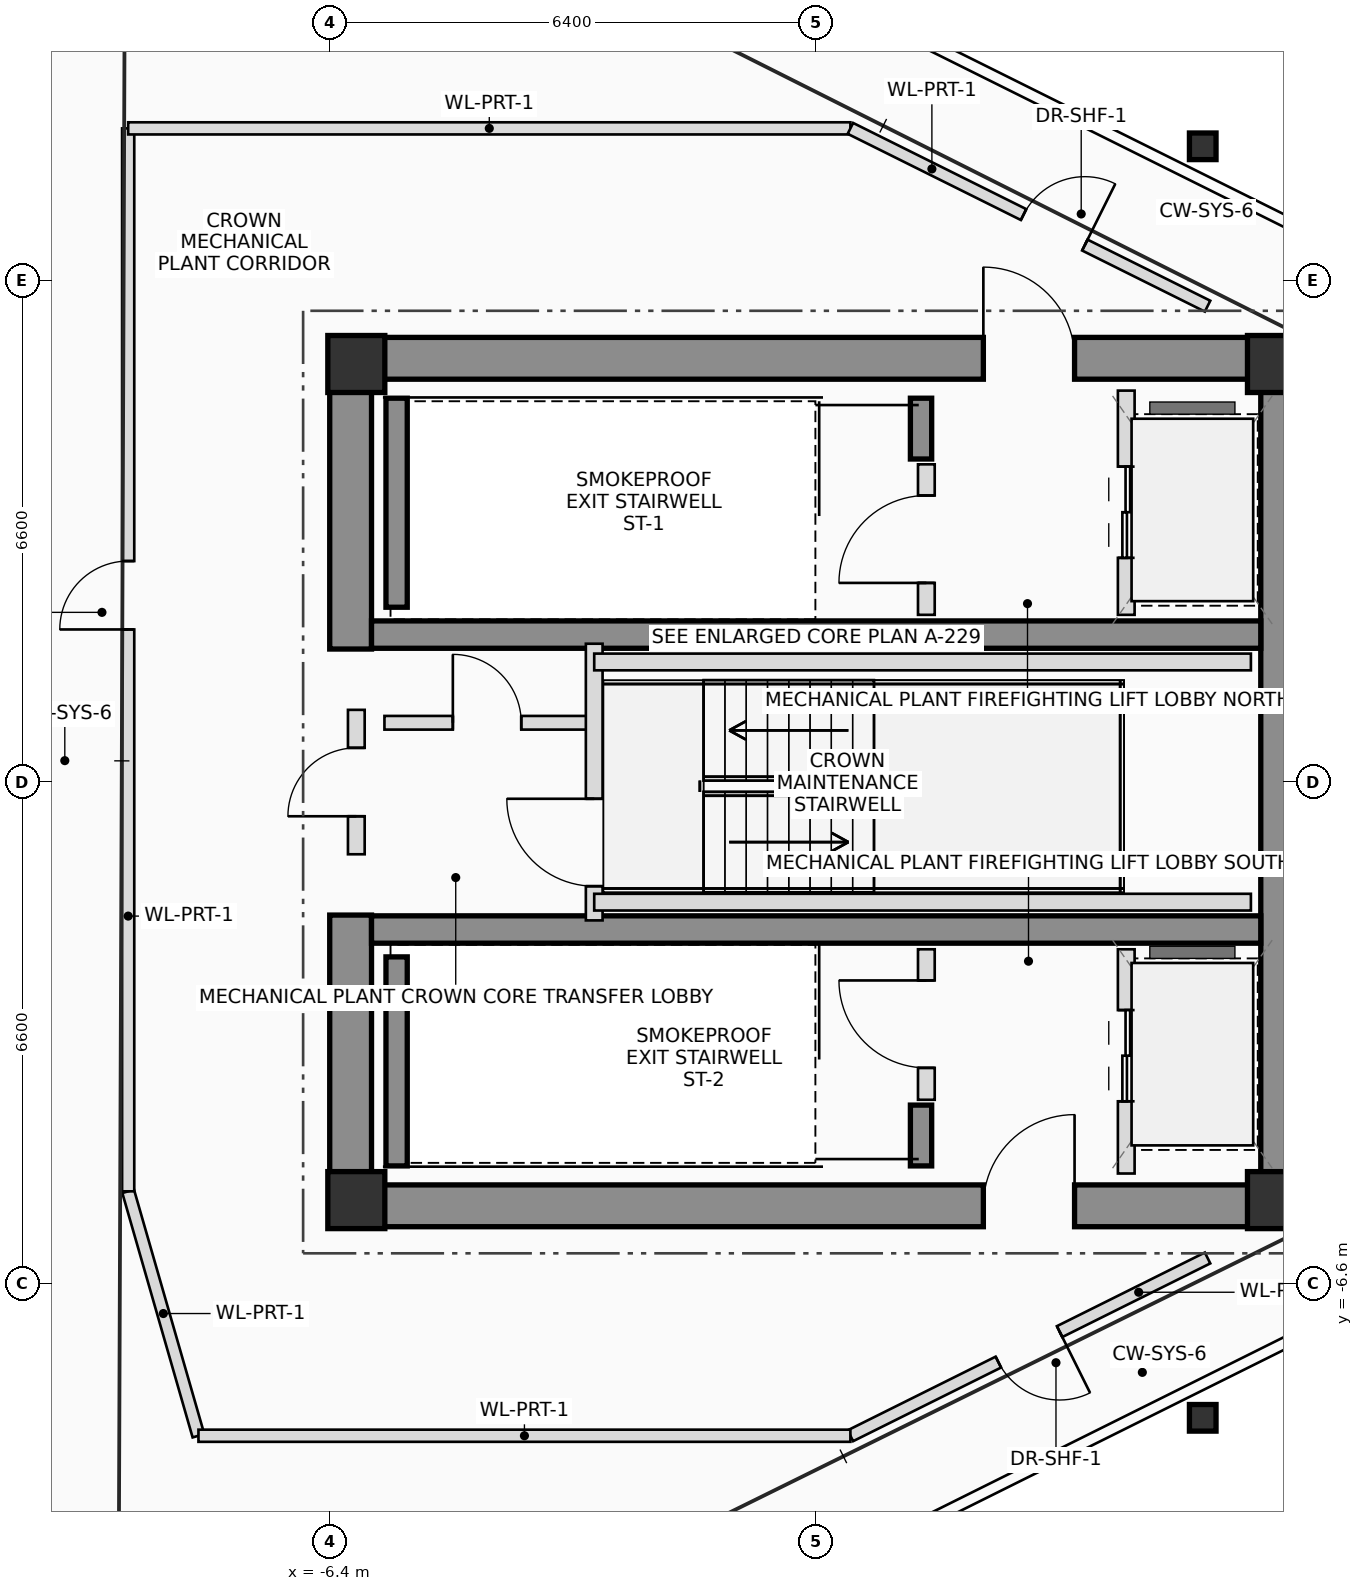
"""IFC4 building model, lengths in metres.
Left out: names, types, materials, properties, quantities, classifications, styles, units other than length and angle.
Written with IfcOpenShell. Run it as: python <this file> out.ifc"""

import sys

from ifc_helpers import new_model, si_unit, direction, frame, frame_2d, origin, origin_2d, place, context, subcontext, project, spatial, rectangle, i_section, extrude, source, transform, mapped, element, fill, save


model = new_model("IFC4")
c1 = context("Model", 3, precision=1e-05, world=origin(), true_north=direction((0.0, 1.0)))
c2 = subcontext(c1, "Body", "Model", "MODEL_VIEW")
j1 = project(units=[si_unit("LENGTHUNIT", "METRE"), si_unit("PLANEANGLEUNIT", "RADIAN")], contexts=[c1])
p1 = place(None, origin())
s1 = spatial("IfcSite", under=j1, at=p1, CompositionType="ELEMENT")
p2 = place(p1, origin())
s2 = spatial("IfcBuilding", under=s1, at=p2, CompositionType="ELEMENT")
p3 = place(p2, frame((0.0, 0.0, 322.85)))
s3 = spatial("IfcBuildingStorey", under=s2, at=p3, CompositionType="ELEMENT", Elevation=322.85)
m1 = source(origin(), c2, "Body", "SweptSolid", [
    extrude(rectangle(XDim=0.75, YDim=0.75, at=origin_2d()), origin(), (0.0, 0.0, 1.0), 5.4),
])
for number, where, z_axis, x_axis in (
    (1, (-6.05, -5.5, 0.0), (0.0, 0.0, 1.0), (1.0, 0.0, 0.0)),
    (2, (6.05, -5.5, 0.0), (0.0, 0.0, 1.0), (1.0, 0.0, 0.0)),
    (3, (6.05, 5.5, 0.0), (0.0, 0.0, 1.0), (1.0, 0.0, 0.0)),
    (4, (-6.05, 5.5, 0.0), (0.0, 0.0, 1.0), (1.0, 0.0, 0.0)),
):
    element("IfcColumn", number, at=place(p3, frame(where, z_axis=z_axis, x_axis=x_axis)), inside=s3, PredefinedType="COLUMN", context=c2, shape_type="MappedRepresentation", body=[
        mapped(m1, transform((0.0, 0.0, 0.0), scale=1.0)),
    ])
p4 = place(p3, frame((-6.4, 5.575, 0.0), z_axis=(0.0, 0.0, 1.0), x_axis=(1.0, 0.0, 0.0)))
e5 = element("IfcWall", 5, at=p4, inside=s3, PredefinedType="SHEAR", context=c2, shape_type="SweptSolid", body=[
    extrude(rectangle(XDim=12.8, YDim=0.55, at=frame_2d((6.4, 0.0))), origin(), (0.0, 0.0, 1.0), 5.4),
])
p5 = place(p4, frame((8.6, 0.0, 0.0)))
e6 = element("IfcOpeningElement", 6, at=p5, cuts=e5, PredefinedType="OPENING", context=c2, shape_type="SweptSolid", body=[
    extrude(rectangle(XDim=1.2, YDim=2.2, at=frame_2d((0.6, 1.1))), frame((0.0, 0.285, 0.0), z_axis=(0.0, -1.0, 0.0), x_axis=(1.0, 0.0, 0.0)), (0.0, 0.0, 1.0), 0.57),
])
p6 = place(p3, frame((-6.4, -5.575, 0.0), z_axis=(0.0, 0.0, 1.0), x_axis=(1.0, 0.0, 0.0)))
e7 = element("IfcWall", 7, at=p6, inside=s3, PredefinedType="SHEAR", context=c2, shape_type="SweptSolid", body=[
    extrude(rectangle(XDim=12.8, YDim=0.55, at=frame_2d((6.4, 0.0))), origin(), (0.0, 0.0, 1.0), 5.4),
])
p7 = place(p6, frame((8.6, 0.0, 0.0)))
e8 = element("IfcOpeningElement", 8, at=p7, cuts=e7, PredefinedType="OPENING", context=c2, shape_type="SweptSolid", body=[
    extrude(rectangle(XDim=1.2, YDim=2.2, at=frame_2d((0.6, 1.1))), frame((0.0, 0.285, 0.0), z_axis=(0.0, -1.0, 0.0), x_axis=(1.0, 0.0, 0.0)), (0.0, 0.0, 1.0), 0.57),
])
p8 = place(p3, frame((6.125, -5.3, 0.0), z_axis=(0.0, 0.0, 1.0), x_axis=(0.0, 1.0, 0.0)))
e9 = element("IfcWall", 9, at=p8, inside=s3, PredefinedType="SHEAR", context=c2, shape_type="SweptSolid", body=[
    extrude(rectangle(XDim=10.6, YDim=0.55, at=frame_2d((5.3, 0.0))), origin(), (0.0, 0.0, 1.0), 5.4),
])
for number, where, z_axis, x_axis in (
    (10, (-6.125, -5.3, 0.0), (0.0, 0.0, 1.0), (0.0, 1.0, 0.0)),
    (11, (-6.125, 1.75, 0.0), (0.0, 0.0, 1.0), (0.0, 1.0, 0.0)),
):
    element("IfcWall", number, at=place(p3, frame(where, z_axis=z_axis, x_axis=x_axis)), inside=s3, PredefinedType="SHEAR", context=c2, shape_type="SweptSolid", body=[
        extrude(rectangle(XDim=3.55, YDim=0.55, at=frame_2d((1.775, 0.0))), origin(), (0.0, 0.0, 1.0), 5.4),
    ])
for number, where, z_axis, x_axis in (
    (12, (-5.85, 1.94, 0.0), (0.0, 0.0, 1.0), (1.0, 0.0, 0.0)),
    (13, (-5.85, -1.94, 0.0), (0.0, 0.0, 1.0), (1.0, 0.0, 0.0)),
):
    element("IfcWall", number, at=place(p3, frame(where, z_axis=z_axis, x_axis=x_axis)), inside=s3, PredefinedType="SHEAR", context=c2, shape_type="SweptSolid", body=[
        extrude(rectangle(XDim=11.7, YDim=0.36, at=frame_2d((5.85, 0.0))), origin(), (0.0, 0.0, 1.0), 5.4),
    ])
p9 = place(p3, frame((-5.52, 2.3, 0.0), z_axis=(0.0, 0.0, 1.0), x_axis=(0.0, 1.0, 0.0)))
e14 = element("IfcWall", 14, at=p9, inside=s3, PredefinedType="SHEAR", context=c2, shape_type="SweptSolid", body=[
    extrude(rectangle(XDim=2.75, YDim=0.28, at=frame_2d((1.375, 0.0))), origin(), (0.0, 0.0, 1.0), 5.4),
])
p10 = place(p3, frame((1.38, 4.25, 0.0), z_axis=(0.0, 0.0, 1.0), x_axis=(0.0, 1.0, 0.0)))
e15 = element("IfcWall", 15, at=p10, inside=s3, PredefinedType="SHEAR", context=c2, shape_type="SweptSolid", body=[
    extrude(rectangle(XDim=0.8, YDim=0.28, at=frame_2d((0.4, 0.0))), origin(), (0.0, 0.0, 1.0), 5.4),
])
p11 = place(p3, frame((-5.52, -5.05, 0.0), z_axis=(0.0, 0.0, 1.0), x_axis=(0.0, 1.0, 0.0)))
e16 = element("IfcWall", 16, at=p11, inside=s3, PredefinedType="SHEAR", context=c2, shape_type="SweptSolid", body=[
    extrude(rectangle(XDim=2.75, YDim=0.28, at=frame_2d((1.375, 0.0))), origin(), (0.0, 0.0, 1.0), 5.4),
])
p12 = place(p3, frame((1.38, -5.05, 0.0), z_axis=(0.0, 0.0, 1.0), x_axis=(0.0, 1.0, 0.0)))
e17 = element("IfcWall", 17, at=p12, inside=s3, PredefinedType="SHEAR", context=c2, shape_type="SweptSolid", body=[
    extrude(rectangle(XDim=0.8, YDim=0.28, at=frame_2d((0.4, 0.0))), origin(), (0.0, 0.0, 1.0), 5.4),
])
m2 = source(origin(), c2, "Body", "SweptSolid", [
    extrude(i_section(OverallWidth=0.35, OverallDepth=0.35, WebThickness=0.012, FlangeThickness=0.019, FilletRadius=0.016, at=origin_2d()), origin(), (0.0, 0.0, 1.0), 5.4),
])
for number, where, z_axis, x_axis in (
    (18, (5.086, -8.364, 0.0), (0.0, 0.0, 1.0), (1.0, 0.0, 0.0)),
    (19, (5.086, 8.364, 0.0), (0.0, 0.0, 1.0), (1.0, 0.0, 0.0)),
):
    element("IfcColumn", number, at=place(p3, frame(where, z_axis=z_axis, x_axis=x_axis)), inside=s3, PredefinedType="COLUMN", context=c2, shape_type="MappedRepresentation", body=[
        mapped(m2, transform((0.0, 0.0, 0.0), scale=1.0)),
    ])
p13 = place(p3, frame((-6.05, -0.95, 0.0), z_axis=(0.0, 0.0, 1.0), x_axis=(0.0, 1.0, 0.0)))
e20 = element("IfcWall", 20, at=p13, inside=s3, PredefinedType="PLUMBINGWALL", context=c2, shape_type="SweptSolid", body=[
    extrude(rectangle(XDim=1.9, YDim=0.22, at=frame_2d((0.95, 0.0))), origin(), (0.0, 0.0, 1.0), 4.1),
])
p14 = place(p13, frame((0.5, 0.0, 0.0)))
e21 = element("IfcOpeningElement", 21, at=p14, cuts=e20, PredefinedType="OPENING", context=c2, shape_type="SweptSolid", body=[
    extrude(rectangle(XDim=0.9, YDim=2.05, at=frame_2d((0.45, 1.025))), frame((0.0, 0.12, 0.0), z_axis=(0.0, -1.0, 0.0), x_axis=(1.0, 0.0, 0.0)), (0.0, 0.0, 1.0), 0.24),
])
p15 = place(p3, frame((1.45, 2.2, 0.0), z_axis=(0.0, 0.0, 1.0), x_axis=(0.0, 1.0, 0.0)))
e22 = element("IfcWall", 22, at=p15, inside=s3, PredefinedType="PLUMBINGWALL", context=c2, shape_type="SweptSolid", body=[
    extrude(rectangle(XDim=1.98, YDim=0.22, at=frame_2d((0.99, 0.0))), origin(), (0.0, 0.0, 1.0), 5.12),
])
p16 = place(p15, frame((0.42, 0.0, 0.0)))
e23 = element("IfcOpeningElement", 23, at=p16, cuts=e22, PredefinedType="OPENING", context=c2, shape_type="SweptSolid", body=[
    extrude(rectangle(XDim=1.15, YDim=2.15, at=frame_2d((0.575, 1.075))), frame((0.0, 0.12, 0.0), z_axis=(0.0, -1.0, 0.0), x_axis=(1.0, 0.0, 0.0)), (0.0, 0.0, 1.0), 0.24),
])
p17 = place(p3, frame((4.08, 2.2, 0.0), z_axis=(0.0, 0.0, 1.0), x_axis=(0.0, 1.0, 0.0)))
e24 = element("IfcWall", 24, at=p17, inside=s3, PredefinedType="PLUMBINGWALL", context=c2, shape_type="SweptSolid", body=[
    extrude(rectangle(XDim=2.95, YDim=0.22, at=frame_2d((1.475, 0.0))), origin(), (0.0, 0.0, 1.0), 5.12),
])
p18 = place(p17, frame((0.75, 0.0, 0.0)))
e25 = element("IfcOpeningElement", 25, at=p18, cuts=e24, PredefinedType="OPENING", context=c2, shape_type="SweptSolid", body=[
    extrude(rectangle(XDim=1.2, YDim=2.25, at=frame_2d((0.6, 1.125))), frame((0.0, 0.12, 0.0), z_axis=(0.0, -1.0, 0.0), x_axis=(1.0, 0.0, 0.0)), (0.0, 0.0, 1.0), 0.24),
])
p19 = place(p3, frame((1.45, -4.18, 0.0), z_axis=(0.0, 0.0, 1.0), x_axis=(0.0, 1.0, 0.0)))
e26 = element("IfcWall", 26, at=p19, inside=s3, PredefinedType="PLUMBINGWALL", context=c2, shape_type="SweptSolid", body=[
    extrude(rectangle(XDim=1.98, YDim=0.22, at=frame_2d((0.99, 0.0))), origin(), (0.0, 0.0, 1.0), 5.12),
])
p20 = place(p19, frame((0.42, 0.0, 0.0)))
e27 = element("IfcOpeningElement", 27, at=p20, cuts=e26, PredefinedType="OPENING", context=c2, shape_type="SweptSolid", body=[
    extrude(rectangle(XDim=1.15, YDim=2.15, at=frame_2d((0.575, 1.075))), frame((0.0, 0.12, 0.0), z_axis=(0.0, -1.0, 0.0), x_axis=(1.0, 0.0, 0.0)), (0.0, 0.0, 1.0), 0.24),
])
p21 = place(p3, frame((4.08, -5.15, 0.0), z_axis=(0.0, 0.0, 1.0), x_axis=(0.0, 1.0, 0.0)))
e28 = element("IfcWall", 28, at=p21, inside=s3, PredefinedType="PLUMBINGWALL", context=c2, shape_type="SweptSolid", body=[
    extrude(rectangle(XDim=2.95, YDim=0.22, at=frame_2d((1.475, 0.0))), origin(), (0.0, 0.0, 1.0), 5.12),
])
p22 = place(p21, frame((0.95, 0.0, 0.0)))
e29 = element("IfcOpeningElement", 29, at=p22, cuts=e28, PredefinedType="OPENING", context=c2, shape_type="SweptSolid", body=[
    extrude(rectangle(XDim=1.2, YDim=2.25, at=frame_2d((0.6, 1.125))), frame((0.0, 0.12, 0.0), z_axis=(0.0, -1.0, 0.0), x_axis=(1.0, 0.0, 0.0)), (0.0, 0.0, 1.0), 0.24),
])
p23 = place(p3, frame((-5.68, 0.78, 0.0), z_axis=(0.0, 0.0, 1.0), x_axis=(1.0, 0.0, 0.0)))
e30 = element("IfcWall", 30, at=p23, inside=s3, PredefinedType="PLUMBINGWALL", context=c2, shape_type="SweptSolid", body=[
    extrude(rectangle(XDim=2.76, YDim=0.18, at=frame_2d((1.38, 0.0))), origin(), (0.0, 0.0, 1.0), 5.12),
])
p24 = place(p23, frame((0.9, 0.0, 0.0)))
e31 = element("IfcOpeningElement", 31, at=p24, cuts=e30, PredefinedType="OPENING", context=c2, shape_type="SweptSolid", body=[
    extrude(rectangle(XDim=0.9, YDim=2.05, at=frame_2d((0.45, 1.025))), frame((0.0, 0.1, 0.0), z_axis=(0.0, -1.0, 0.0), x_axis=(1.0, 0.0, 0.0)), (0.0, 0.0, 1.0), 0.2),
])
p25 = place(p3, frame((-2.92, -1.82, 0.0), z_axis=(0.0, 0.0, 1.0), x_axis=(0.0, 1.0, 0.0)))
e32 = element("IfcWall", 32, at=p25, inside=s3, PredefinedType="PLUMBINGWALL", context=c2, shape_type="SweptSolid", body=[
    extrude(rectangle(XDim=3.64, YDim=0.22, at=frame_2d((1.82, 0.0))), origin(), (0.0, 0.0, 1.0), 5.12),
])
p26 = place(p25, frame((0.45, 0.0, 0.0)))
e33 = element("IfcOpeningElement", 33, at=p26, cuts=e32, PredefinedType="OPENING", context=c2, shape_type="SweptSolid", body=[
    extrude(rectangle(XDim=1.15, YDim=2.15, at=frame_2d((0.575, 1.075))), frame((0.0, 0.12, 0.0), z_axis=(0.0, -1.0, 0.0), x_axis=(1.0, 0.0, 0.0)), (0.0, 0.0, 1.0), 0.24),
])
for number, where, z_axis, x_axis in (
    (34, (-2.92, 1.58, 0.0), (0.0, 0.0, 1.0), (1.0, 0.0, 0.0)),
    (35, (-2.92, -1.58, 0.0), (0.0, 0.0, 1.0), (1.0, 0.0, 0.0)),
):
    element("IfcWall", number, at=place(p3, frame(where, z_axis=z_axis, x_axis=x_axis)), inside=s3, PredefinedType="PLUMBINGWALL", context=c2, shape_type="SweptSolid", body=[
        extrude(rectangle(XDim=8.64, YDim=0.22, at=frame_2d((4.32, 0.0))), origin(), (0.0, 0.0, 1.0), 3.59),
    ])
p27 = place(p3, frame((-8.127, -8.6, 0.0), z_axis=(0.0, 0.0, 1.0), x_axis=(-0.276397565718, 0.961043383862, 0.0)))
e36 = element("IfcWall", 36, at=p27, inside=s3, PredefinedType="PARTITIONING", context=c2, shape_type="SweptSolid", body=[
    extrude(rectangle(XDim=3.346, YDim=0.16, at=frame_2d((1.673, 0.0))), origin(), (0.0, 0.0, 1.0), 5.12),
])
p28 = place(p3, frame((-9.052, -5.385, 0.0), z_axis=(0.0, 0.0, 1.0), x_axis=(0.0, 1.0, 0.0)))
e37 = element("IfcWall", 37, at=p28, inside=s3, PredefinedType="PARTITIONING", context=c2, shape_type="SweptSolid", body=[
    extrude(rectangle(XDim=13.985, YDim=0.16, at=frame_2d((6.992, 0.0))), origin(), (0.0, 0.0, 1.0), 5.12),
])
p29 = place(p28, frame((7.392, 0.0, 0.0)))
e38 = element("IfcOpeningElement", 38, at=p29, cuts=e37, PredefinedType="OPENING", context=c2, shape_type="SweptSolid", body=[
    extrude(rectangle(XDim=0.9, YDim=2.05, at=frame_2d((0.45, 1.025))), frame((0.0, 0.09, 0.0), z_axis=(0.0, -1.0, 0.0), x_axis=(1.0, 0.0, 0.0)), (0.0, 0.0, 1.0), 0.18),
])
p30 = place(p3, frame((-9.052, 8.6, 0.0), z_axis=(0.0, 0.0, 1.0), x_axis=(1.0, 0.0, 0.0)))
e39 = element("IfcWall", 39, at=p30, inside=s3, PredefinedType="PARTITIONING", context=c2, shape_type="SweptSolid", body=[
    extrude(rectangle(XDim=9.502, YDim=0.16, at=frame_2d((4.751, 0.0))), origin(), (0.0, 0.0, 1.0), 5.12),
])
p31 = place(p3, frame((0.451, 8.6, 0.0), z_axis=(0.0, 0.0, 1.0), x_axis=(0.895225733131, -0.445612933766, 0.0)))
e40 = element("IfcWall", 40, at=p31, inside=s3, PredefinedType="PARTITIONING", context=c2, shape_type="SweptSolid", body=[
    extrude(rectangle(XDim=5.249, YDim=0.16, at=frame_2d((2.625, 0.0))), origin(), (0.0, 0.0, 1.0), 5.12),
])
p32 = place(p31, frame((2.545, 0.0, 0.0)))
e41 = element("IfcOpeningElement", 41, at=p32, cuts=e40, PredefinedType="OPENING", context=c2, shape_type="SweptSolid", body=[
    extrude(rectangle(XDim=0.9, YDim=2.05, at=frame_2d((0.45, 1.025))), frame((0.0, 0.09, 0.0), z_axis=(0.0, -1.0, 0.0), x_axis=(1.0, 0.0, 0.0)), (0.0, 0.0, 1.0), 0.18),
])
p33 = place(p3, frame((5.15, -6.261, 0.0), z_axis=(0.0, 0.0, 1.0), x_axis=(-0.895225733131, -0.445612933766, 0.0)))
e42 = element("IfcWall", 42, at=p33, inside=s3, PredefinedType="PARTITIONING", context=c2, shape_type="SweptSolid", body=[
    extrude(rectangle(XDim=5.249, YDim=0.16, at=frame_2d((2.625, 0.0))), origin(), (0.0, 0.0, 1.0), 5.12),
])
p34 = place(p33, frame((2.175, 0.0, 0.0)))
e43 = element("IfcOpeningElement", 43, at=p34, cuts=e42, PredefinedType="OPENING", context=c2, shape_type="SweptSolid", body=[
    extrude(rectangle(XDim=0.9, YDim=2.05, at=frame_2d((0.45, 1.025))), frame((0.0, 0.09, 0.0), z_axis=(0.0, -1.0, 0.0), x_axis=(1.0, 0.0, 0.0)), (0.0, 0.0, 1.0), 0.18),
])
p35 = place(p3, frame((0.451, -8.6, 0.0), z_axis=(0.0, 0.0, 1.0), x_axis=(-1.0, 0.0, 0.0)))
e44 = element("IfcWall", 44, at=p35, inside=s3, PredefinedType="PARTITIONING", context=c2, shape_type="SweptSolid", body=[
    extrude(rectangle(XDim=8.578, YDim=0.16, at=frame_2d((4.289, 0.0))), origin(), (0.0, 0.0, 1.0), 5.12),
])
p36 = place(p5, origin())
e45 = element("IfcDoor", 45, at=p36, inside=s3, OperationType="SINGLE_SWING_LEFT", PredefinedType="DOOR", context=c2, shape_type="SweptSolid", body=[
    extrude(rectangle(XDim=1.2, YDim=2.2, at=frame_2d((0.6, 1.1))), frame((0.0, 0.025, 0.0), z_axis=(0.0, -1.0, 0.0), x_axis=(1.0, 0.0, 0.0)), (0.0, 0.0, 1.0), 0.05),
])
fill(e6, e45)
p37 = place(p7, origin())
e46 = element("IfcDoor", 46, at=p37, inside=s3, OperationType="SINGLE_SWING_RIGHT", PredefinedType="DOOR", context=c2, shape_type="SweptSolid", body=[
    extrude(rectangle(XDim=1.2, YDim=2.2, at=frame_2d((0.6, 1.1))), frame((0.0, 0.025, 0.0), z_axis=(0.0, -1.0, 0.0), x_axis=(1.0, 0.0, 0.0)), (0.0, 0.0, 1.0), 0.05),
])
fill(e8, e46)
p38 = place(p14, origin())
e47 = element("IfcDoor", 47, at=p38, inside=s3, OperationType="SINGLE_SWING_LEFT", PredefinedType="DOOR", context=c2, shape_type="SweptSolid", body=[
    extrude(rectangle(XDim=0.9, YDim=2.05, at=frame_2d((0.45, 1.025))), frame((0.0, 0.025, 0.0), z_axis=(0.0, -1.0, 0.0), x_axis=(1.0, 0.0, 0.0)), (0.0, 0.0, 1.0), 0.05),
])
fill(e21, e47)
p39 = place(p16, origin())
e48 = element("IfcDoor", 48, at=p39, inside=s3, OperationType="SINGLE_SWING_LEFT", PredefinedType="DOOR", context=c2, shape_type="SweptSolid", body=[
    extrude(rectangle(XDim=1.15, YDim=2.15, at=frame_2d((0.575, 1.075))), frame((0.0, 0.025, 0.0), z_axis=(0.0, -1.0, 0.0), x_axis=(1.0, 0.0, 0.0)), (0.0, 0.0, 1.0), 0.05),
])
fill(e23, e48)
p40 = place(p18, origin())
e49 = element("IfcDoor", 49, at=p40, inside=s3, OperationType="DOUBLE_DOOR_SLIDING", PredefinedType="DOOR", context=c2, shape_type="SweptSolid", body=[
    extrude(rectangle(XDim=1.2, YDim=2.25, at=frame_2d((0.6, 1.125))), frame((0.0, 0.025, 0.0), z_axis=(0.0, -1.0, 0.0), x_axis=(1.0, 0.0, 0.0)), (0.0, 0.0, 1.0), 0.05),
])
fill(e25, e49)
p41 = place(p20, origin())
e50 = element("IfcDoor", 50, at=p41, inside=s3, OperationType="SINGLE_SWING_RIGHT", PredefinedType="DOOR", context=c2, shape_type="SweptSolid", body=[
    extrude(rectangle(XDim=1.15, YDim=2.15, at=frame_2d((0.575, 1.075))), frame((0.0, 0.025, 0.0), z_axis=(0.0, -1.0, 0.0), x_axis=(1.0, 0.0, 0.0)), (0.0, 0.0, 1.0), 0.05),
])
fill(e27, e50)
p42 = place(p22, origin())
e51 = element("IfcDoor", 51, at=p42, inside=s3, OperationType="DOUBLE_DOOR_SLIDING", PredefinedType="DOOR", context=c2, shape_type="SweptSolid", body=[
    extrude(rectangle(XDim=1.2, YDim=2.25, at=frame_2d((0.6, 1.125))), frame((0.0, 0.025, 0.0), z_axis=(0.0, -1.0, 0.0), x_axis=(1.0, 0.0, 0.0)), (0.0, 0.0, 1.0), 0.05),
])
fill(e29, e51)
p43 = place(p24, origin())
e52 = element("IfcDoor", 52, at=p43, inside=s3, OperationType="SINGLE_SWING_LEFT", PredefinedType="DOOR", context=c2, shape_type="SweptSolid", body=[
    extrude(rectangle(XDim=0.9, YDim=2.05, at=frame_2d((0.45, 1.025))), frame((0.0, 0.025, 0.0), z_axis=(0.0, -1.0, 0.0), x_axis=(1.0, 0.0, 0.0)), (0.0, 0.0, 1.0), 0.05),
])
fill(e31, e52)
p44 = place(p26, origin())
e53 = element("IfcDoor", 53, at=p44, inside=s3, OperationType="SINGLE_SWING_RIGHT", PredefinedType="DOOR", context=c2, shape_type="SweptSolid", body=[
    extrude(rectangle(XDim=1.15, YDim=2.15, at=frame_2d((0.575, 1.075))), frame((0.0, 0.025, 0.0), z_axis=(0.0, -1.0, 0.0), x_axis=(1.0, 0.0, 0.0)), (0.0, 0.0, 1.0), 0.05),
])
fill(e33, e53)
p45 = place(p29, origin())
e54 = element("IfcDoor", 54, at=p45, inside=s3, OperationType="SINGLE_SWING_LEFT", PredefinedType="DOOR", context=c2, shape_type="SweptSolid", body=[
    extrude(rectangle(XDim=0.9, YDim=2.05, at=frame_2d((0.45, 1.025))), frame((0.0, 0.025, 0.0), z_axis=(0.0, -1.0, 0.0), x_axis=(1.0, 0.0, 0.0)), (0.0, 0.0, 1.0), 0.05),
])
fill(e38, e54)
p46 = place(p32, origin())
e55 = element("IfcDoor", 55, at=p46, inside=s3, OperationType="SINGLE_SWING_RIGHT", PredefinedType="DOOR", context=c2, shape_type="SweptSolid", body=[
    extrude(rectangle(XDim=0.9, YDim=2.05, at=frame_2d((0.45, 1.025))), frame((0.0, 0.025, 0.0), z_axis=(0.0, -1.0, 0.0), x_axis=(1.0, 0.0, 0.0)), (0.0, 0.0, 1.0), 0.05),
])
fill(e41, e55)
p47 = place(p34, origin())
e56 = element("IfcDoor", 56, at=p47, inside=s3, OperationType="SINGLE_SWING_LEFT", PredefinedType="DOOR", context=c2, shape_type="SweptSolid", body=[
    extrude(rectangle(XDim=0.9, YDim=2.05, at=frame_2d((0.45, 1.025))), frame((0.0, 0.025, 0.0), z_axis=(0.0, -1.0, 0.0), x_axis=(1.0, 0.0, 0.0)), (0.0, 0.0, 1.0), 0.05),
])
fill(e43, e56)
save(model, sys.argv[1])
